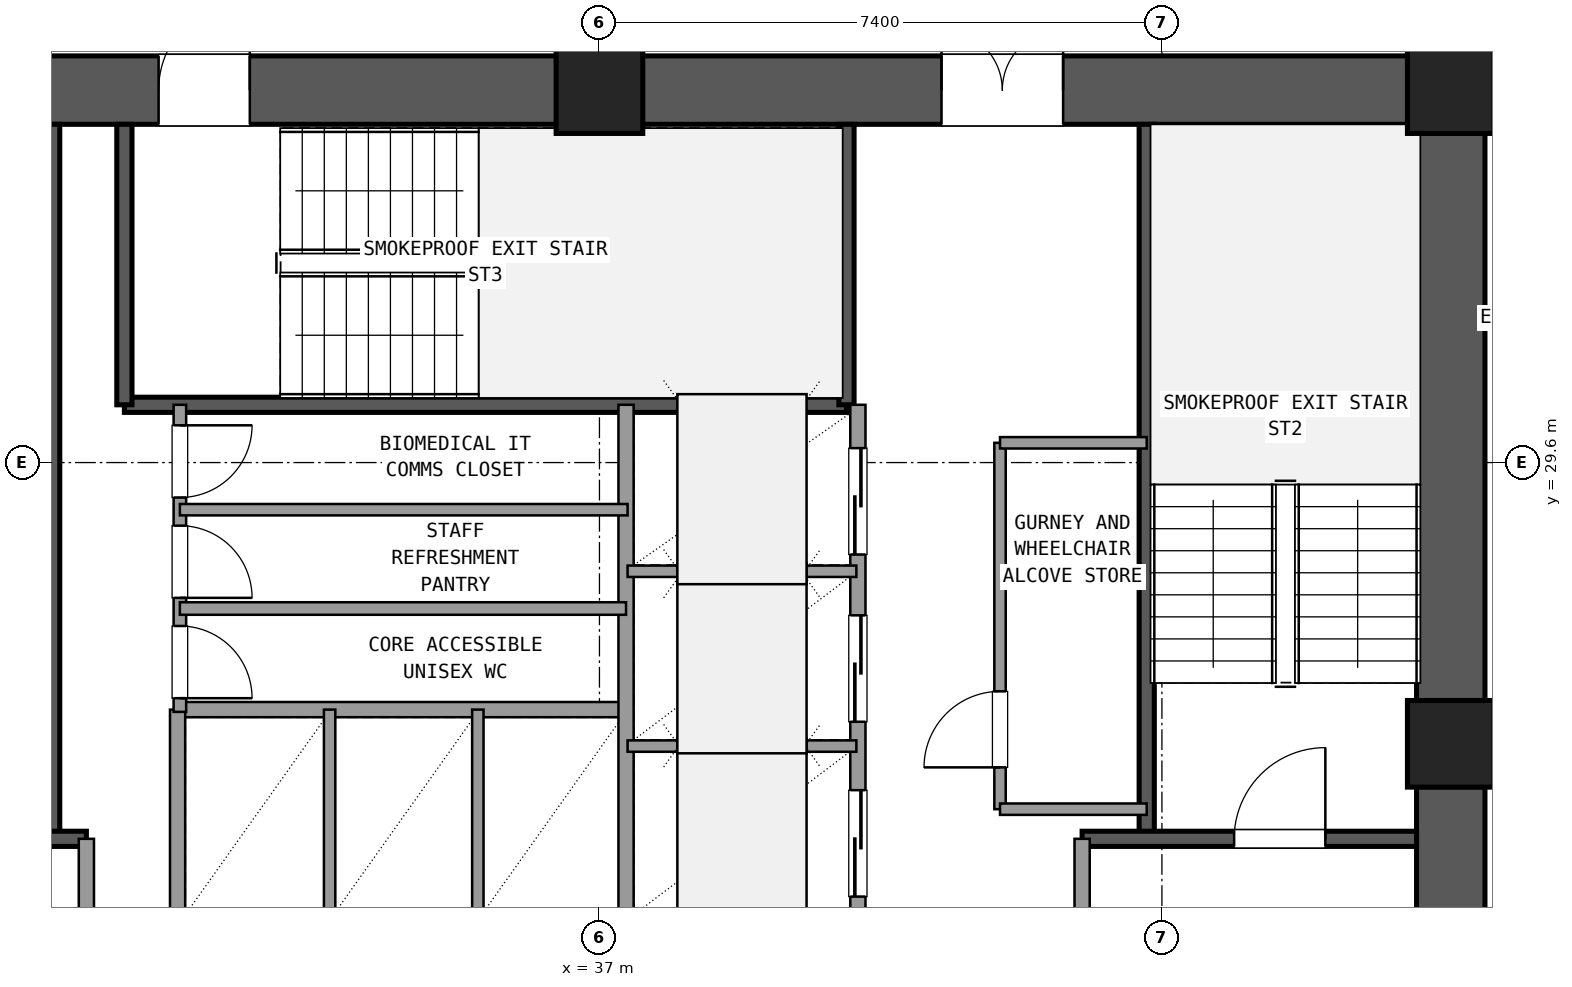
"""IFC4 building model, lengths in metres.
Left out: names, types, materials, properties, quantities, classifications, styles, units other than length and angle.
Written with IfcOpenShell. Run it as: python <this file> out.ifc"""

import sys

from ifc_helpers import new_model, si_unit, direction, frame, frame_2d, origin, origin_2d, place, context, subcontext, project, spatial, rectangle, extrude, element, fill, save


model = new_model("IFC4")
c1 = context("Model", 3, precision=1e-05, world=origin(), true_north=direction((0.0, 1.0)))
c2 = subcontext(c1, "Body", "Model", "MODEL_VIEW")
j1 = project(units=[si_unit("LENGTHUNIT", "METRE"), si_unit("PLANEANGLEUNIT", "RADIAN")], contexts=[c1])
p1 = place(None, origin())
s1 = spatial("IfcSite", under=j1, at=p1, CompositionType="ELEMENT")
p2 = place(p1, origin())
s2 = spatial("IfcBuilding", under=s1, at=p2, CompositionType="ELEMENT")
p3 = place(p2, frame((0.0, 0.0, 41.94)))
s3 = spatial("IfcBuildingStorey", under=s2, at=p3, CompositionType="ELEMENT", Elevation=41.94)
for number, where, z_axis, x_axis in (
    (1, (48.2, 25.9, 0.0), (0.0, 0.0, 1.0), (1.0, 0.0, 0.0)),
    (2, (48.2, 34.5, 0.0), (0.0, 0.0, 1.0), (1.0, 0.0, 0.0)),
    (3, (37.0, 34.5, 0.0), (0.0, 0.0, 1.0), (1.0, 0.0, 0.0)),
):
    element("IfcColumn", number, at=place(p3, frame(where, z_axis=z_axis, x_axis=x_axis)), inside=s3, PredefinedType="COLUMN", context=c2, shape_type="SweptSolid", body=[
        extrude(rectangle(XDim=1.14, YDim=1.14, at=origin_2d()), origin(), (0.0, 0.0, 1.0), 3.6),
    ])
p4 = place(p3, frame((48.2, 17.865, 0.0), z_axis=(0.0, 0.0, 1.0), x_axis=(0.0, 1.0, 0.0)))
e4 = element("IfcWall", 4, at=p4, inside=s3, PredefinedType="SHEAR", context=c2, shape_type="SweptSolid", body=[
    extrude(rectangle(XDim=7.47, YDim=0.9, at=frame_2d((3.735, 0.0))), origin(), (0.0, 0.0, 1.0), 3.32),
])
p5 = place(p4, frame((4.185, 0.0, 0.0)))
e5 = element("IfcOpeningElement", 5, at=p5, cuts=e4, PredefinedType="OPENING", context=c2, shape_type="SweptSolid", body=[
    extrude(rectangle(XDim=1.2, YDim=2.15, at=frame_2d((0.6, 1.075))), frame((0.0, 0.46, 0.0), z_axis=(0.0, -1.0, 0.0), x_axis=(1.0, 0.0, 0.0)), (0.0, 0.0, 1.0), 0.92),
])
p6 = place(p3, frame((48.2, 26.465, 0.0), z_axis=(0.0, 0.0, 1.0), x_axis=(0.0, 1.0, 0.0)))
e6 = element("IfcWall", 6, at=p6, inside=s3, PredefinedType="SHEAR", context=c2, shape_type="SweptSolid", body=[
    extrude(rectangle(XDim=7.47, YDim=0.9, at=frame_2d((3.735, 0.0))), origin(), (0.0, 0.0, 1.0), 3.32),
])
p7 = place(p3, frame((47.635, 34.5, 0.0), z_axis=(0.0, 0.0, 1.0), x_axis=(-1.0, 0.0, 0.0)))
e7 = element("IfcWall", 7, at=p7, inside=s3, PredefinedType="SHEAR", context=c2, shape_type="SweptSolid", body=[
    extrude(rectangle(XDim=10.07, YDim=0.9, at=frame_2d((5.035, 0.0))), origin(), (0.0, 0.0, 1.0), 3.32),
])
p8 = place(p7, frame((4.535, 0.0, 0.0)))
e8 = element("IfcOpeningElement", 8, at=p8, cuts=e7, PredefinedType="OPENING", context=c2, shape_type="SweptSolid", body=[
    extrude(rectangle(XDim=1.6, YDim=2.2, at=frame_2d((0.8, 1.1))), frame((0.0, 0.46, 0.0), z_axis=(0.0, -1.0, 0.0), x_axis=(1.0, 0.0, 0.0)), (0.0, 0.0, 1.0), 0.92),
])
p9 = place(p3, frame((36.435, 34.5, 0.0), z_axis=(0.0, 0.0, 1.0), x_axis=(-1.0, 0.0, 0.0)))
e9 = element("IfcWall", 9, at=p9, inside=s3, PredefinedType="SHEAR", context=c2, shape_type="SweptSolid", body=[
    extrude(rectangle(XDim=10.07, YDim=0.9, at=frame_2d((5.035, 0.0))), origin(), (0.0, 0.0, 1.0), 3.32),
])
p10 = place(p9, frame((4.035, 0.0, 0.0)))
e10 = element("IfcOpeningElement", 10, at=p10, cuts=e9, PredefinedType="OPENING", context=c2, shape_type="SweptSolid", body=[
    extrude(rectangle(XDim=1.2, YDim=2.15, at=frame_2d((0.6, 1.075))), frame((0.0, 0.46, 0.0), z_axis=(0.0, -1.0, 0.0), x_axis=(1.0, 0.0, 0.0)), (0.0, 0.0, 1.0), 0.92),
])
p11 = place(p3, frame((29.8, 24.65, 0.0), z_axis=(0.0, 0.0, 1.0), x_axis=(0.0, 1.0, 0.0)))
e11 = element("IfcWall", 11, at=p11, inside=s3, PredefinedType="SHEAR", context=c2, shape_type="SweptSolid", body=[
    extrude(rectangle(XDim=9.4, YDim=0.2, at=frame_2d((4.7, 0.0))), origin(), (0.0, 0.0, 1.0), 3.32),
])
p12 = place(p3, frame((26.25, 24.65, 0.0), z_axis=(0.0, 0.0, 1.0), x_axis=(1.0, 0.0, 0.0)))
e12 = element("IfcWall", 12, at=p12, inside=s3, PredefinedType="SHEAR", context=c2, shape_type="SweptSolid", body=[
    extrude(rectangle(XDim=4.0, YDim=0.2, at=frame_2d((2.0, 0.0))), origin(), (0.0, 0.0, 1.0), 3.32),
])
p13 = place(p12, frame((1.0, 0.0, 0.0)))
e13 = element("IfcOpeningElement", 13, at=p13, cuts=e12, PredefinedType="OPENING", context=c2, shape_type="SweptSolid", body=[
    extrude(rectangle(XDim=1.2, YDim=2.15, at=frame_2d((0.6, 1.075))), frame((0.0, 0.11, 0.0), z_axis=(0.0, -1.0, 0.0), x_axis=(1.0, 0.0, 0.0)), (0.0, 0.0, 1.0), 0.22),
])
p14 = place(p3, frame((44.2, 24.65, 0.0), z_axis=(0.0, 0.0, 1.0), x_axis=(0.0, 1.0, 0.0)))
e14 = element("IfcWall", 14, at=p14, inside=s3, PredefinedType="SHEAR", context=c2, shape_type="SweptSolid", body=[
    extrude(rectangle(XDim=9.4, YDim=0.2, at=frame_2d((4.7, 0.0))), origin(), (0.0, 0.0, 1.0), 3.32),
])
p15 = place(p3, frame((43.35, 24.65, 0.0), z_axis=(0.0, 0.0, 1.0), x_axis=(1.0, 0.0, 0.0)))
e15 = element("IfcWall", 15, at=p15, inside=s3, PredefinedType="SHEAR", context=c2, shape_type="SweptSolid", body=[
    extrude(rectangle(XDim=4.4, YDim=0.2, at=frame_2d((2.2, 0.0))), origin(), (0.0, 0.0, 1.0), 3.32),
])
p16 = place(p15, frame((2.0, 0.0, 0.0)))
e16 = element("IfcOpeningElement", 16, at=p16, cuts=e15, PredefinedType="OPENING", context=c2, shape_type="SweptSolid", body=[
    extrude(rectangle(XDim=1.2, YDim=2.15, at=frame_2d((0.6, 1.075))), frame((0.0, 0.11, 0.0), z_axis=(0.0, -1.0, 0.0), x_axis=(1.0, 0.0, 0.0)), (0.0, 0.0, 1.0), 0.22),
])
p17 = place(p3, frame((30.75, 30.36, 0.0), z_axis=(0.0, 0.0, 1.0), x_axis=(1.0, 0.0, 0.0)))
e17 = element("IfcWall", 17, at=p17, inside=s3, PredefinedType="SHEAR", context=c2, shape_type="SweptSolid", body=[
    extrude(rectangle(XDim=9.5, YDim=0.2, at=frame_2d((4.75, 0.0))), origin(), (0.0, 0.0, 1.0), 3.32),
])
for number, where, z_axis, x_axis in (
    (18, (30.75, 30.36, 0.0), (0.0, 0.0, 1.0), (0.0, 1.0, 0.0)),
    (19, (40.25, 30.36, 0.0), (0.0, 0.0, 1.0), (0.0, 1.0, 0.0)),
):
    element("IfcWall", number, at=place(p3, frame(where, z_axis=z_axis, x_axis=x_axis)), inside=s3, PredefinedType="SHEAR", context=c2, shape_type="SweptSolid", body=[
        extrude(rectangle(XDim=3.69, YDim=0.2, at=frame_2d((1.845, 0.0))), origin(), (0.0, 0.0, 1.0), 3.32),
    ])
p18 = place(p3, frame((30.25, 17.75, 0.0), z_axis=(0.0, 0.0, 1.0), x_axis=(0.0, 1.0, 0.0)))
e20 = element("IfcWall", 20, at=p18, inside=s3, PredefinedType="SOLIDWALL", context=c2, shape_type="SweptSolid", body=[
    extrude(rectangle(XDim=6.9, YDim=0.2, at=frame_2d((3.45, 0.0))), origin(), (0.0, 0.0, 1.0), 2.61),
])
p19 = place(p18, frame((4.15, 0.0, 0.0)))
e21 = element("IfcOpeningElement", 21, at=p19, cuts=e20, PredefinedType="OPENING", context=c2, shape_type="SweptSolid", body=[
    extrude(rectangle(XDim=1.2, YDim=2.15, at=frame_2d((0.6, 1.075))), frame((0.0, 0.11, 0.0), z_axis=(0.0, -1.0, 0.0), x_axis=(1.0, 0.0, 0.0)), (0.0, 0.0, 1.0), 0.22),
])
p20 = place(p3, frame((43.35, 17.75, 0.0), z_axis=(0.0, 0.0, 1.0), x_axis=(0.0, 1.0, 0.0)))
e22 = element("IfcWall", 22, at=p20, inside=s3, PredefinedType="SOLIDWALL", context=c2, shape_type="SweptSolid", body=[
    extrude(rectangle(XDim=6.9, YDim=0.2, at=frame_2d((3.45, 0.0))), origin(), (0.0, 0.0, 1.0), 2.61),
])
p21 = place(p20, frame((4.15, 0.0, 0.0)))
e23 = element("IfcOpeningElement", 23, at=p21, cuts=e22, PredefinedType="OPENING", context=c2, shape_type="SweptSolid", body=[
    extrude(rectangle(XDim=1.2, YDim=2.15, at=frame_2d((0.6, 1.075))), frame((0.0, 0.11, 0.0), z_axis=(0.0, -1.0, 0.0), x_axis=(1.0, 0.0, 0.0)), (0.0, 0.0, 1.0), 0.22),
])
p22 = place(p3, frame((31.45, 26.35, 0.0), z_axis=(0.0, 0.0, 1.0), x_axis=(1.0, 0.0, 0.0)))
e24 = element("IfcWall", 24, at=p22, inside=s3, PredefinedType="SOLIDWALL", context=c2, shape_type="SweptSolid", body=[
    extrude(rectangle(XDim=5.9, YDim=0.2, at=frame_2d((2.95, 0.0))), origin(), (0.0, 0.0, 1.0), 2.61),
])
p23 = place(p3, frame((31.45, 23.54, 0.0), z_axis=(0.0, 0.0, 1.0), x_axis=(0.0, 1.0, 0.0)))
e25 = element("IfcWall", 25, at=p23, inside=s3, PredefinedType="SOLIDWALL", context=c2, shape_type="SweptSolid", body=[
    extrude(rectangle(XDim=2.81, YDim=0.2, at=frame_2d((1.405, 0.0))), origin(), (0.0, 0.0, 1.0), 2.61),
])
for number, where, z_axis, x_axis in (
    (26, (33.45, 23.54, 0.0), (0.0, 0.0, 1.0), (0.0, 1.0, 0.0)),
    (27, (35.4, 23.54, 0.0), (0.0, 0.0, 1.0), (0.0, 1.0, 0.0)),
):
    element("IfcWall", number, at=place(p3, frame(where, z_axis=z_axis, x_axis=x_axis)), inside=s3, PredefinedType="PARTITIONING", context=c2, shape_type="SweptSolid", body=[
        extrude(rectangle(XDim=2.81, YDim=0.15, at=frame_2d((1.405, 0.0))), origin(), (0.0, 0.0, 1.0), 2.61),
    ])
p24 = place(p3, frame((37.35, 23.54, 0.0), z_axis=(0.0, 0.0, 1.0), x_axis=(0.0, 1.0, 0.0)))
e28 = element("IfcWall", 28, at=p24, inside=s3, PredefinedType="SOLIDWALL", context=c2, shape_type="SweptSolid", body=[
    extrude(rectangle(XDim=6.82, YDim=0.2, at=frame_2d((3.41, 0.0))), origin(), (0.0, 0.0, 1.0), 2.61),
])
p25 = place(p3, frame((40.4, 23.54, 0.0), z_axis=(0.0, 0.0, 1.0), x_axis=(0.0, 1.0, 0.0)))
e29 = element("IfcWall", 29, at=p25, inside=s3, PredefinedType="SOLIDWALL", context=c2, shape_type="SweptSolid", body=[
    extrude(rectangle(XDim=6.82, YDim=0.2, at=frame_2d((3.41, 0.0))), origin(), (0.0, 0.0, 1.0), 2.61),
])
p26 = place(p25, frame((0.35, 0.0, 0.0)))
e30 = element("IfcOpeningElement", 30, at=p26, cuts=e29, PredefinedType="OPENING", context=c2, shape_type="SweptSolid", body=[
    extrude(rectangle(XDim=1.4, YDim=2.2, at=frame_2d((0.7, 1.1))), frame((0.0, 0.11, 0.0), z_axis=(0.0, -1.0, 0.0), x_axis=(1.0, 0.0, 0.0)), (0.0, 0.0, 1.0), 0.22),
])
p27 = place(p25, frame((2.65, 0.0, 0.0)))
e31 = element("IfcOpeningElement", 31, at=p27, cuts=e29, PredefinedType="OPENING", context=c2, shape_type="SweptSolid", body=[
    extrude(rectangle(XDim=1.4, YDim=2.2, at=frame_2d((0.7, 1.1))), frame((0.0, 0.11, 0.0), z_axis=(0.0, -1.0, 0.0), x_axis=(1.0, 0.0, 0.0)), (0.0, 0.0, 1.0), 0.22),
])
p28 = place(p25, frame((4.85, 0.0, 0.0)))
e32 = element("IfcOpeningElement", 32, at=p28, cuts=e29, PredefinedType="OPENING", context=c2, shape_type="SweptSolid", body=[
    extrude(rectangle(XDim=1.4, YDim=2.2, at=frame_2d((0.7, 1.1))), frame((0.0, 0.11, 0.0), z_axis=(0.0, -1.0, 0.0), x_axis=(1.0, 0.0, 0.0)), (0.0, 0.0, 1.0), 0.22),
])
for number, where, z_axis, x_axis in (
    (33, (37.37, 25.87, 0.0), (0.0, 0.0, 1.0), (1.0, 0.0, 0.0)),
    (34, (37.37, 28.17, 0.0), (0.0, 0.0, 1.0), (1.0, 0.0, 0.0)),
):
    element("IfcWall", number, at=place(p3, frame(where, z_axis=z_axis, x_axis=x_axis)), inside=s3, PredefinedType="PARTITIONING", context=c2, shape_type="SweptSolid", body=[
        extrude(rectangle(XDim=3.01, YDim=0.15, at=frame_2d((1.505, 0.0))), origin(), (0.0, 0.0, 1.0), 2.61),
    ])
p29 = place(p3, frame((42.27, 25.04, 0.0), z_axis=(0.0, 0.0, 1.0), x_axis=(0.0, 1.0, 0.0)))
e35 = element("IfcWall", 35, at=p29, inside=s3, PredefinedType="PARTITIONING", context=c2, shape_type="SweptSolid", body=[
    extrude(rectangle(XDim=4.82, YDim=0.15, at=frame_2d((2.41, 0.0))), origin(), (0.0, 0.0, 1.0), 2.61),
])
p30 = place(p29, frame((0.55, 0.0, 0.0)))
e36 = element("IfcOpeningElement", 36, at=p30, cuts=e35, PredefinedType="OPENING", context=c2, shape_type="SweptSolid", body=[
    extrude(rectangle(XDim=1.0, YDim=2.15, at=frame_2d((0.5, 1.075))), frame((0.0, 0.085, 0.0), z_axis=(0.0, -1.0, 0.0), x_axis=(1.0, 0.0, 0.0)), (0.0, 0.0, 1.0), 0.17),
])
for number, where, z_axis, x_axis in (
    (37, (42.27, 25.04, 0.0), (0.0, 0.0, 1.0), (1.0, 0.0, 0.0)),
    (38, (42.27, 29.86, 0.0), (0.0, 0.0, 1.0), (1.0, 0.0, 0.0)),
):
    element("IfcWall", number, at=place(p3, frame(where, z_axis=z_axis, x_axis=x_axis)), inside=s3, PredefinedType="PARTITIONING", context=c2, shape_type="SweptSolid", body=[
        extrude(rectangle(XDim=1.93, YDim=0.15, at=frame_2d((0.965, 0.0))), origin(), (0.0, 0.0, 1.0), 2.61),
    ])
p31 = place(p3, frame((31.48, 26.32, 0.0), z_axis=(0.0, 0.0, 1.0), x_axis=(0.0, 1.0, 0.0)))
e39 = element("IfcWall", 39, at=p31, inside=s3, PredefinedType="PLUMBINGWALL", context=c2, shape_type="SweptSolid", body=[
    extrude(rectangle(XDim=4.04, YDim=0.165, at=frame_2d((2.02, 0.0))), origin(), (0.0, 0.0, 1.0), 2.61),
])
p32 = place(p31, frame((0.18, 0.0, 0.0)))
e40 = element("IfcOpeningElement", 40, at=p32, cuts=e39, PredefinedType="OPENING", context=c2, shape_type="SweptSolid", body=[
    extrude(rectangle(XDim=0.95, YDim=2.1, at=frame_2d((0.475, 1.05))), frame((0.0, 0.093, 0.0), z_axis=(0.0, -1.0, 0.0), x_axis=(1.0, 0.0, 0.0)), (0.0, 0.0, 1.0), 0.185),
])
p33 = place(p31, frame((1.5, 0.0, 0.0)))
e41 = element("IfcOpeningElement", 41, at=p33, cuts=e39, PredefinedType="OPENING", context=c2, shape_type="SweptSolid", body=[
    extrude(rectangle(XDim=0.95, YDim=2.1, at=frame_2d((0.475, 1.05))), frame((0.0, 0.093, 0.0), z_axis=(0.0, -1.0, 0.0), x_axis=(1.0, 0.0, 0.0)), (0.0, 0.0, 1.0), 0.185),
])
p34 = place(p31, frame((2.82, 0.0, 0.0)))
e42 = element("IfcOpeningElement", 42, at=p34, cuts=e39, PredefinedType="OPENING", context=c2, shape_type="SweptSolid", body=[
    extrude(rectangle(XDim=0.95, YDim=2.1, at=frame_2d((0.475, 1.05))), frame((0.0, 0.093, 0.0), z_axis=(0.0, -1.0, 0.0), x_axis=(1.0, 0.0, 0.0)), (0.0, 0.0, 1.0), 0.185),
])
p35 = place(p3, frame((31.48, 27.68, 0.0), z_axis=(0.0, 0.0, 1.0), x_axis=(1.0, 0.0, 0.0)))
e43 = element("IfcWall", 43, at=p35, inside=s3, PredefinedType="PLUMBINGWALL", context=c2, shape_type="SweptSolid", body=[
    extrude(rectangle(XDim=5.87, YDim=0.165, at=frame_2d((2.935, 0.0))), origin(), (0.0, 0.0, 1.0), 2.61),
])
p36 = place(p3, frame((31.48, 28.98, 0.0), z_axis=(0.0, 0.0, 1.0), x_axis=(1.0, 0.0, 0.0)))
e44 = element("IfcWall", 44, at=p36, inside=s3, PredefinedType="PARTITIONING", context=c2, shape_type="SweptSolid", body=[
    extrude(rectangle(XDim=5.89, YDim=0.15, at=frame_2d((2.945, 0.0))), origin(), (0.0, 0.0, 1.0), 2.61),
])
p37 = place(p3, frame((37.0, 34.95, 0.0), z_axis=(0.0, 0.0, 1.0), x_axis=(0.0, 1.0, 0.0)))
e45 = element("IfcWall", 45, at=p37, inside=s3, PredefinedType="PARTITIONING", context=c2, shape_type="SweptSolid", body=[
    extrude(rectangle(XDim=2.7, YDim=0.18, at=frame_2d((1.35, 0.0))), origin(), (0.0, 0.0, 1.0), 2.61),
])
p38 = place(p37, frame((0.35, 0.0, 0.0)))
e46 = element("IfcOpeningElement", 46, at=p38, cuts=e45, PredefinedType="OPENING", context=c2, shape_type="SweptSolid", body=[
    extrude(rectangle(XDim=2.0, YDim=2.2, at=frame_2d((1.0, 1.1))), frame((0.0, 0.1, 0.0), z_axis=(0.0, -1.0, 0.0), x_axis=(1.0, 0.0, 0.0)), (0.0, 0.0, 1.0), 0.2),
])
p39 = place(p16, origin())
e47 = element("IfcDoor", 47, at=p39, inside=s3, OperationType="SINGLE_SWING_RIGHT", PredefinedType="DOOR", context=c2, shape_type="SweptSolid", body=[
    extrude(rectangle(XDim=1.2, YDim=2.15, at=frame_2d((0.6, 1.075))), frame((0.0, 0.025, 0.0), z_axis=(0.0, -1.0, 0.0), x_axis=(1.0, 0.0, 0.0)), (0.0, 0.0, 1.0), 0.05),
])
fill(e16, e47)
p40 = place(p8, frame((1.6, 0.0, 0.0), z_axis=(0.0, 0.0, 1.0), x_axis=(-1.0, 0.0, 0.0)))
e48 = element("IfcDoor", 48, at=p40, inside=s3, OperationType="DOUBLE_DOOR_SINGLE_SWING", PredefinedType="DOOR", context=c2, shape_type="SweptSolid", body=[
    extrude(rectangle(XDim=1.6, YDim=2.2, at=frame_2d((0.8, 1.1))), frame((0.0, 0.025, 0.0), z_axis=(0.0, -1.0, 0.0), x_axis=(1.0, 0.0, 0.0)), (0.0, 0.0, 1.0), 0.05),
])
fill(e8, e48)
p41 = place(p10, frame((1.2, 0.0, 0.0), z_axis=(0.0, 0.0, 1.0), x_axis=(-1.0, 0.0, 0.0)))
e49 = element("IfcDoor", 49, at=p41, inside=s3, OperationType="SINGLE_SWING_LEFT", PredefinedType="DOOR", context=c2, shape_type="SweptSolid", body=[
    extrude(rectangle(XDim=1.2, YDim=2.15, at=frame_2d((0.6, 1.075))), frame((0.0, 0.025, 0.0), z_axis=(0.0, -1.0, 0.0), x_axis=(1.0, 0.0, 0.0)), (0.0, 0.0, 1.0), 0.05),
])
fill(e10, e49)
p42 = place(p26, origin())
e50 = element("IfcDoor", 50, at=p42, inside=s3, OperationType="SLIDING_TO_LEFT", PredefinedType="DOOR", context=c2, shape_type="SweptSolid", body=[
    extrude(rectangle(XDim=1.4, YDim=2.2, at=frame_2d((0.7, 1.1))), frame((0.0, 0.025, 0.0), z_axis=(0.0, -1.0, 0.0), x_axis=(1.0, 0.0, 0.0)), (0.0, 0.0, 1.0), 0.05),
])
fill(e30, e50)
p43 = place(p27, origin())
e51 = element("IfcDoor", 51, at=p43, inside=s3, OperationType="SLIDING_TO_LEFT", PredefinedType="DOOR", context=c2, shape_type="SweptSolid", body=[
    extrude(rectangle(XDim=1.4, YDim=2.2, at=frame_2d((0.7, 1.1))), frame((0.0, 0.025, 0.0), z_axis=(0.0, -1.0, 0.0), x_axis=(1.0, 0.0, 0.0)), (0.0, 0.0, 1.0), 0.05),
])
fill(e31, e51)
p44 = place(p28, origin())
e52 = element("IfcDoor", 52, at=p44, inside=s3, OperationType="SLIDING_TO_RIGHT", PredefinedType="DOOR", context=c2, shape_type="SweptSolid", body=[
    extrude(rectangle(XDim=1.4, YDim=2.2, at=frame_2d((0.7, 1.1))), frame((0.0, 0.025, 0.0), z_axis=(0.0, -1.0, 0.0), x_axis=(1.0, 0.0, 0.0)), (0.0, 0.0, 1.0), 0.05),
])
fill(e32, e52)
p45 = place(p30, origin())
e53 = element("IfcDoor", 53, at=p45, inside=s3, OperationType="SINGLE_SWING_LEFT", PredefinedType="DOOR", context=c2, shape_type="SweptSolid", body=[
    extrude(rectangle(XDim=1.0, YDim=2.15, at=frame_2d((0.5, 1.075))), frame((0.0, 0.025, 0.0), z_axis=(0.0, -1.0, 0.0), x_axis=(1.0, 0.0, 0.0)), (0.0, 0.0, 1.0), 0.05),
])
fill(e36, e53)
p46 = place(p32, frame((0.95, 0.0, 0.0), z_axis=(0.0, 0.0, 1.0), x_axis=(-1.0, 0.0, 0.0)))
e54 = element("IfcDoor", 54, at=p46, inside=s3, OperationType="SINGLE_SWING_LEFT", PredefinedType="DOOR", context=c2, shape_type="SweptSolid", body=[
    extrude(rectangle(XDim=0.95, YDim=2.1, at=frame_2d((0.475, 1.05))), frame((0.0, 0.025, 0.0), z_axis=(0.0, -1.0, 0.0), x_axis=(1.0, 0.0, 0.0)), (0.0, 0.0, 1.0), 0.05),
])
fill(e40, e54)
p47 = place(p33, frame((0.95, 0.0, 0.0), z_axis=(0.0, 0.0, 1.0), x_axis=(-1.0, 0.0, 0.0)))
e55 = element("IfcDoor", 55, at=p47, inside=s3, OperationType="SINGLE_SWING_LEFT", PredefinedType="DOOR", context=c2, shape_type="SweptSolid", body=[
    extrude(rectangle(XDim=0.95, YDim=2.1, at=frame_2d((0.475, 1.05))), frame((0.0, 0.025, 0.0), z_axis=(0.0, -1.0, 0.0), x_axis=(1.0, 0.0, 0.0)), (0.0, 0.0, 1.0), 0.05),
])
fill(e41, e55)
p48 = place(p34, frame((0.95, 0.0, 0.0), z_axis=(0.0, 0.0, 1.0), x_axis=(-1.0, 0.0, 0.0)))
e56 = element("IfcDoor", 56, at=p48, inside=s3, OperationType="SINGLE_SWING_RIGHT", PredefinedType="DOOR", context=c2, shape_type="SweptSolid", body=[
    extrude(rectangle(XDim=0.95, YDim=2.1, at=frame_2d((0.475, 1.05))), frame((0.0, 0.025, 0.0), z_axis=(0.0, -1.0, 0.0), x_axis=(1.0, 0.0, 0.0)), (0.0, 0.0, 1.0), 0.05),
])
fill(e42, e56)
save(model, sys.argv[1])
